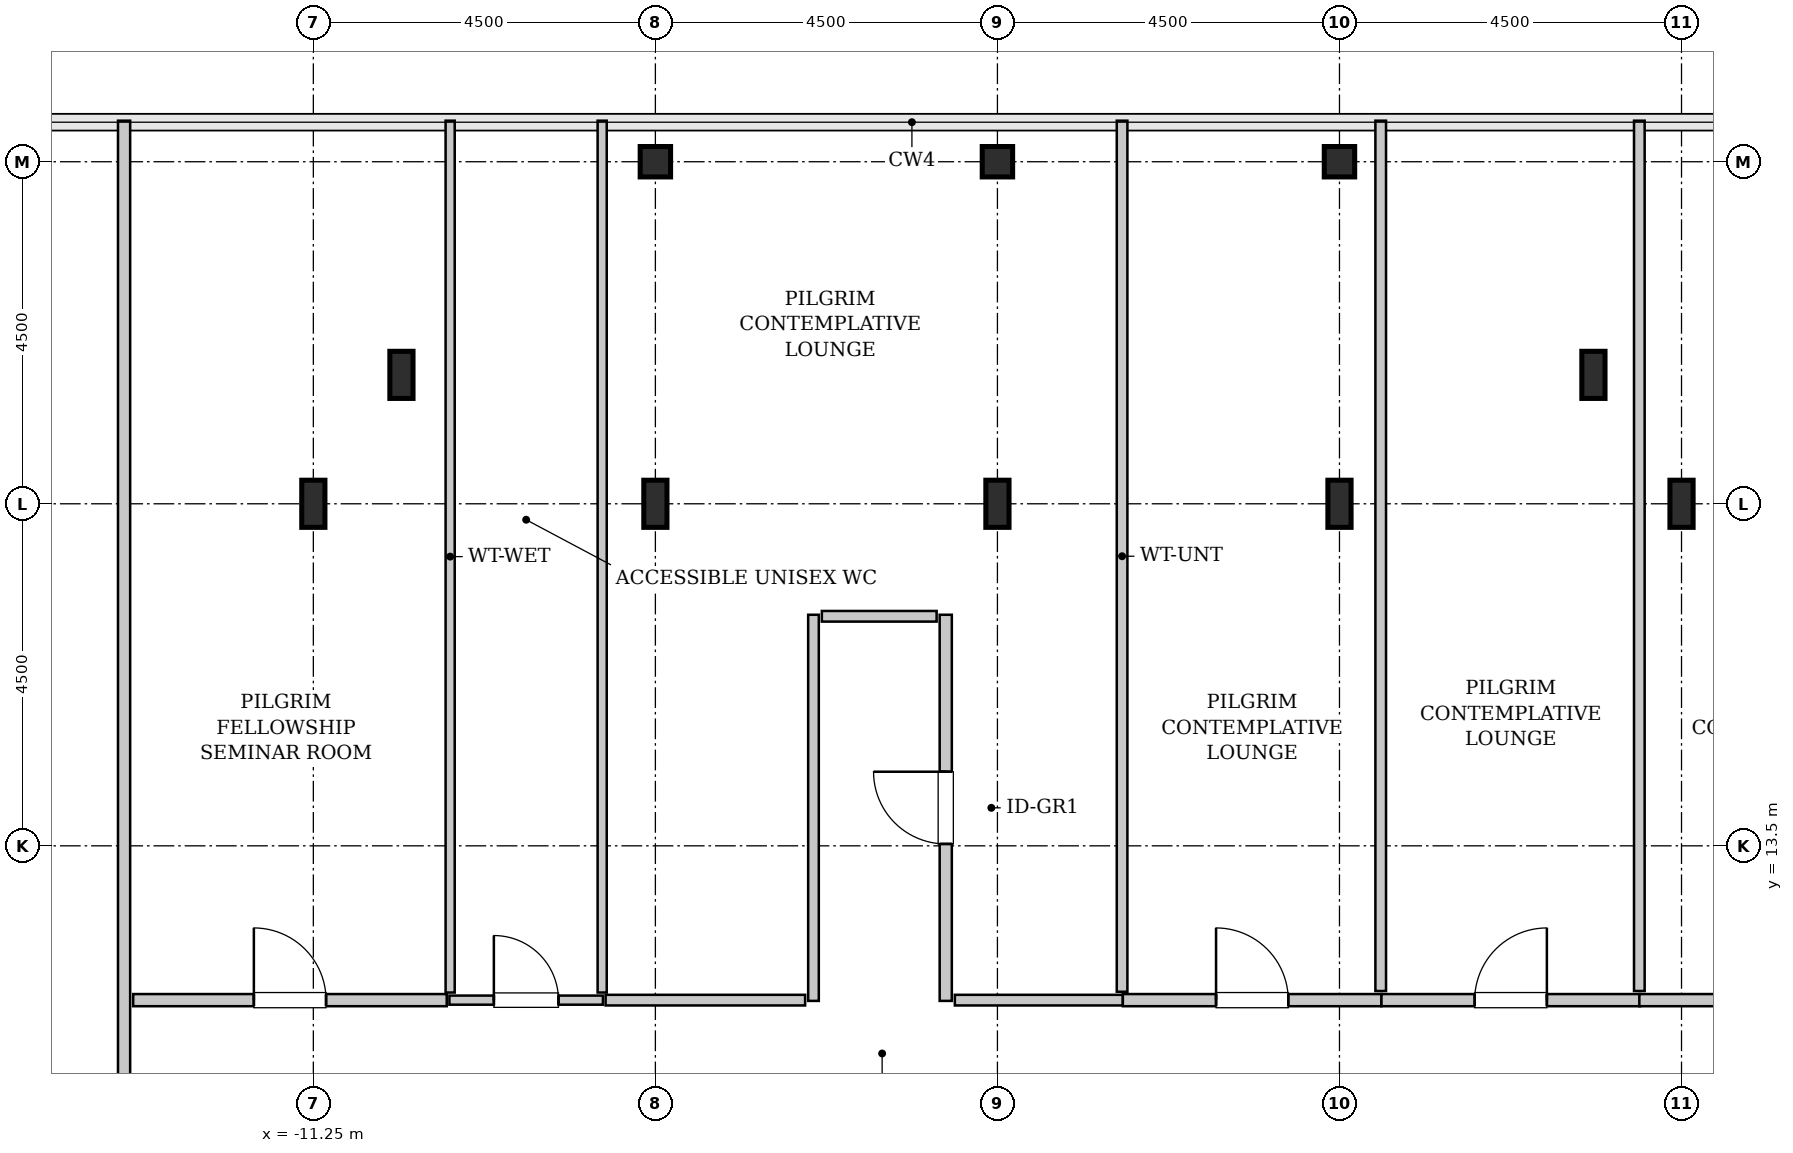
"""IFC4 building model, lengths in metres.
Left out: names, types, materials, properties, quantities, classifications, styles, units other than length and angle.
Written with IfcOpenShell. Run it as: python <this file> out.ifc"""

import sys

from ifc_helpers import new_model, si_unit, direction, frame, frame_2d, origin, origin_2d, place, context, subcontext, project, spatial, rectangle, hollow_rectangle, i_section, extrude, source, transform, mapped, element, fill, save


model = new_model("IFC4")
c1 = context("Model", 3, precision=1e-05, world=origin(), true_north=direction((0.0, 1.0)))
c2 = subcontext(c1, "Body", "Model", "MODEL_VIEW")
j1 = project(units=[si_unit("LENGTHUNIT", "METRE"), si_unit("PLANEANGLEUNIT", "RADIAN")], contexts=[c1])
p1 = place(None, origin())
s1 = spatial("IfcSite", under=j1, at=p1, CompositionType="ELEMENT")
p2 = place(p1, origin())
s2 = spatial("IfcBuilding", under=s1, at=p2, CompositionType="ELEMENT")
p3 = place(p2, frame((0.0, 0.0, 345.2)))
s3 = spatial("IfcBuildingStorey", under=s2, at=p3, CompositionType="ELEMENT", Elevation=345.2)
m1 = source(origin(), c2, "Body", "SweptSolid", [
    extrude(i_section(OverallWidth=0.305, OverallDepth=0.62, WebThickness=0.021, FlangeThickness=0.04, FilletRadius=0.027, at=origin_2d()), origin(), (0.0, 0.0, 1.0), 3.8),
])
for number, where, z_axis, x_axis in (
    (1, (-11.25, 18.0, 0.0), (0.0, 0.0, 1.0), (1.0, 0.0, 0.0)),
    (2, (-10.091, 19.696, 0.0), (0.0, 0.0, 1.0), (1.0, 0.0, 0.0)),
    (3, (-6.75, 18.0, 0.0), (0.0, 0.0, 1.0), (1.0, 0.0, 0.0)),
):
    element("IfcColumn", number, at=place(p3, frame(where, z_axis=z_axis, x_axis=x_axis)), inside=s3, PredefinedType="COLUMN", context=c2, shape_type="MappedRepresentation", body=[
        mapped(m1, transform((0.0, 0.0, 0.0), x_axis=(1.0, 0.0, 0.0), y_axis=(0.0, 1.0, 0.0), z_axis=(0.0, 0.0, 1.0), scale=1.0)),
    ])
m2 = source(origin(), c2, "Body", "SweptSolid", [
    extrude(hollow_rectangle(XDim=0.4, YDim=0.4, WallThickness=0.02, InnerFilletRadius=0.02, OuterFilletRadius=0.04, at=origin_2d()), origin(), (0.0, 0.0, 1.0), 3.8),
])
p4 = place(p3, frame((-6.75, 22.5, 0.0), z_axis=(0.0, 0.0, 1.0), x_axis=(1.0, 0.0, 0.0)))
e4 = element("IfcColumn", 4, at=p4, inside=s3, PredefinedType="COLUMN", context=c2, shape_type="MappedRepresentation", body=[
    mapped(m2, transform((0.0, 0.0, 0.0), x_axis=(1.0, 0.0, 0.0), y_axis=(0.0, 1.0, 0.0), z_axis=(0.0, 0.0, 1.0), scale=1.0)),
])
p5 = place(p3, frame((-2.25, 18.0, 0.0), z_axis=(0.0, 0.0, 1.0), x_axis=(1.0, 0.0, 0.0)))
e5 = element("IfcColumn", 5, at=p5, inside=s3, PredefinedType="COLUMN", context=c2, shape_type="MappedRepresentation", body=[
    mapped(m1, transform((0.0, 0.0, 0.0), x_axis=(1.0, 0.0, 0.0), y_axis=(0.0, 1.0, 0.0), z_axis=(0.0, 0.0, 1.0), scale=1.0)),
])
p6 = place(p3, frame((-2.25, 22.5, 0.0), z_axis=(0.0, 0.0, 1.0), x_axis=(1.0, 0.0, 0.0)))
e6 = element("IfcColumn", 6, at=p6, inside=s3, PredefinedType="COLUMN", context=c2, shape_type="MappedRepresentation", body=[
    mapped(m2, transform((0.0, 0.0, 0.0), x_axis=(1.0, 0.0, 0.0), y_axis=(0.0, 1.0, 0.0), z_axis=(0.0, 0.0, 1.0), scale=1.0)),
])
p7 = place(p3, frame((2.25, 18.0, 0.0), z_axis=(0.0, 0.0, 1.0), x_axis=(1.0, 0.0, 0.0)))
e7 = element("IfcColumn", 7, at=p7, inside=s3, PredefinedType="COLUMN", context=c2, shape_type="MappedRepresentation", body=[
    mapped(m1, transform((0.0, 0.0, 0.0), x_axis=(1.0, 0.0, 0.0), y_axis=(0.0, 1.0, 0.0), z_axis=(0.0, 0.0, 1.0), scale=1.0)),
])
p8 = place(p3, frame((2.25, 22.5, 0.0), z_axis=(0.0, 0.0, 1.0), x_axis=(1.0, 0.0, 0.0)))
e8 = element("IfcColumn", 8, at=p8, inside=s3, PredefinedType="COLUMN", context=c2, shape_type="MappedRepresentation", body=[
    mapped(m2, transform((0.0, 0.0, 0.0), x_axis=(1.0, 0.0, 0.0), y_axis=(0.0, 1.0, 0.0), z_axis=(0.0, 0.0, 1.0), scale=1.0)),
])
for number, where, z_axis, x_axis in (
    (9, (5.591, 19.696, 0.0), (0.0, 0.0, 1.0), (1.0, 0.0, 0.0)),
    (10, (6.75, 18.0, 0.0), (0.0, 0.0, 1.0), (1.0, 0.0, 0.0)),
):
    element("IfcColumn", number, at=place(p3, frame(where, z_axis=z_axis, x_axis=x_axis)), inside=s3, PredefinedType="COLUMN", context=c2, shape_type="MappedRepresentation", body=[
        mapped(m1, transform((0.0, 0.0, 0.0), x_axis=(1.0, 0.0, 0.0), y_axis=(0.0, 1.0, 0.0), z_axis=(0.0, 0.0, 1.0), scale=1.0)),
    ])
m3 = source(origin(), c2, "Body", "SweptSolid", [
    extrude(rectangle(XDim=2.02, YDim=0.12, at=frame_2d((1.01, 0.0))), origin(), (0.0, 0.0, 1.0), 3.485),
])
p9 = place(p3, frame((-9.46, 11.47, 0.0), z_axis=(0.0, 0.0, 1.0), x_axis=(1.0, 0.0, 0.0)))
e11 = element("IfcWall", 11, at=p9, inside=s3, PredefinedType="PLUMBINGWALL", context=c2, shape_type="MappedRepresentation", body=[
    mapped(m3, transform((0.0, 0.0, 0.0), x_axis=(1.0, 0.0, 0.0), y_axis=(0.0, 1.0, 0.0), z_axis=(0.0, 0.0, 1.0), scale=1.0)),
])
p10 = place(p9, frame((0.585, 0.0, 0.0)))
e12 = element("IfcOpeningElement", 12, at=p10, cuts=e11, PredefinedType="OPENING", context=c2, shape_type="SweptSolid", body=[
    extrude(rectangle(XDim=0.85, YDim=2.1, at=frame_2d((0.425, 1.05))), frame((0.0, 0.07, 0.0), z_axis=(0.0, -1.0, 0.0), x_axis=(1.0, 0.0, 0.0)), (0.0, 0.0, 1.0), 0.14),
])
m4 = source(origin(), c2, "Body", "SweptSolid", [
    extrude(rectangle(XDim=11.47, YDim=0.12, at=frame_2d((5.735, 0.0))), origin(), (0.0, 0.0, 1.0), 3.485),
])
for number, where, z_axis, x_axis in (
    (13, (-9.45, 11.57, 0.0), (0.0, 0.0, 1.0), (0.0, 1.0, 0.0)),
    (14, (-7.45, 11.57, 0.0), (0.0, 0.0, 1.0), (0.0, 1.0, 0.0)),
):
    element("IfcWall", number, at=place(p3, frame(where, z_axis=z_axis, x_axis=x_axis)), inside=s3, PredefinedType="PLUMBINGWALL", context=c2, shape_type="MappedRepresentation", body=[
        mapped(m4, transform((0.0, 0.0, 0.0), x_axis=(1.0, 0.0, 0.0), y_axis=(0.0, 1.0, 0.0), z_axis=(0.0, 0.0, 1.0), scale=1.0)),
    ])
m5 = source(origin(), c2, "Body", "SweptSolid", [
    extrude(rectangle(XDim=14.545, YDim=0.16, at=frame_2d((7.272, 0.0))), origin(), (0.0, 0.0, 1.0), 3.485),
])
p11 = place(p3, frame((-13.74, 8.495, 0.0), z_axis=(0.0, 0.0, 1.0), x_axis=(0.0, 1.0, 0.0)))
e15 = element("IfcWall", 15, at=p11, inside=s3, PredefinedType="PARTITIONING", context=c2, shape_type="MappedRepresentation", body=[
    mapped(m5, transform((0.0, 0.0, 0.0), x_axis=(1.0, 0.0, 0.0), y_axis=(0.0, 1.0, 0.0), z_axis=(0.0, 0.0, 1.0), scale=1.0)),
])
p12 = place(p11, frame((1.032, 0.0, 0.0)))
e16 = element("IfcOpeningElement", 16, at=p12, cuts=e15, PredefinedType="OPENING", context=c2, shape_type="SweptSolid", body=[
    extrude(rectangle(XDim=0.95, YDim=2.1, at=frame_2d((0.475, 1.05))), frame((0.0, 0.09, 0.0), z_axis=(0.0, -1.0, 0.0), x_axis=(1.0, 0.0, 0.0)), (0.0, 0.0, 1.0), 0.18),
])
m6 = source(origin(), c2, "Body", "SweptSolid", [
    extrude(rectangle(XDim=4.125, YDim=0.16, at=frame_2d((2.062, 0.0))), origin(), (0.0, 0.0, 1.0), 3.485),
])
p13 = place(p3, frame((-13.62, 11.47, 0.0), z_axis=(0.0, 0.0, 1.0), x_axis=(1.0, 0.0, 0.0)))
e17 = element("IfcWall", 17, at=p13, inside=s3, PredefinedType="PARTITIONING", context=c2, shape_type="MappedRepresentation", body=[
    mapped(m6, transform((0.0, 0.0, 0.0), x_axis=(1.0, 0.0, 0.0), y_axis=(0.0, 1.0, 0.0), z_axis=(0.0, 0.0, 1.0), scale=1.0)),
])
p14 = place(p13, frame((1.587, 0.0, 0.0)))
e18 = element("IfcOpeningElement", 18, at=p14, cuts=e17, PredefinedType="OPENING", context=c2, shape_type="SweptSolid", body=[
    extrude(rectangle(XDim=0.95, YDim=2.1, at=frame_2d((0.475, 1.05))), frame((0.0, 0.09, 0.0), z_axis=(0.0, -1.0, 0.0), x_axis=(1.0, 0.0, 0.0)), (0.0, 0.0, 1.0), 0.18),
])
m7 = source(origin(), c2, "Body", "SweptSolid", [
    extrude(rectangle(XDim=5.08, YDim=0.16, at=frame_2d((2.54, 0.0))), origin(), (0.0, 0.0, 1.0), 3.485),
])
p15 = place(p3, frame((-2.93, 11.46, 0.0), z_axis=(0.0, 0.0, 1.0), x_axis=(0.0, 1.0, 0.0)))
e19 = element("IfcWall", 19, at=p15, inside=s3, PredefinedType="PARTITIONING", context=c2, shape_type="MappedRepresentation", body=[
    mapped(m7, transform((0.0, 0.0, 0.0), x_axis=(1.0, 0.0, 0.0), y_axis=(0.0, 1.0, 0.0), z_axis=(0.0, 0.0, 1.0), scale=1.0)),
])
p16 = place(p15, frame((2.065, 0.0, 0.0)))
e20 = element("IfcOpeningElement", 20, at=p16, cuts=e19, PredefinedType="OPENING", context=c2, shape_type="SweptSolid", body=[
    extrude(rectangle(XDim=0.95, YDim=2.1, at=frame_2d((0.475, 1.05))), frame((0.0, 0.09, 0.0), z_axis=(0.0, -1.0, 0.0), x_axis=(1.0, 0.0, 0.0)), (0.0, 0.0, 1.0), 0.18),
])
m8 = source(origin(), c2, "Body", "SweptSolid", [
    extrude(rectangle(XDim=5.08, YDim=0.14, at=frame_2d((2.54, 0.0))), origin(), (0.0, 0.0, 1.0), 3.485),
])
p17 = place(p3, frame((-4.67, 11.46, 0.0), z_axis=(0.0, 0.0, 1.0), x_axis=(0.0, 1.0, 0.0)))
e21 = element("IfcWall", 21, at=p17, inside=s3, PredefinedType="PARTITIONING", context=c2, shape_type="MappedRepresentation", body=[
    mapped(m8, transform((0.0, 0.0, 0.0), x_axis=(1.0, 0.0, 0.0), y_axis=(0.0, 1.0, 0.0), z_axis=(0.0, 0.0, 1.0), scale=1.0)),
])
m9 = source(origin(), c2, "Body", "SweptSolid", [
    extrude(rectangle(XDim=2.625, YDim=0.14, at=frame_2d((1.312, 0.0))), origin(), (0.0, 0.0, 1.0), 3.485),
])
p18 = place(p3, frame((-7.405, 11.47, 0.0), z_axis=(0.0, 0.0, 1.0), x_axis=(1.0, 0.0, 0.0)))
e22 = element("IfcWall", 22, at=p18, inside=s3, PredefinedType="PARTITIONING", context=c2, shape_type="MappedRepresentation", body=[
    mapped(m9, transform((0.0, 0.0, 0.0), x_axis=(1.0, 0.0, 0.0), y_axis=(0.0, 1.0, 0.0), z_axis=(0.0, 0.0, 1.0), scale=1.0)),
])
m10 = source(origin(), c2, "Body", "SweptSolid", [
    extrude(rectangle(XDim=2.21, YDim=0.14, at=frame_2d((1.105, 0.0))), origin(), (0.0, 0.0, 1.0), 3.485),
])
p19 = place(p3, frame((-2.81, 11.47, 0.0), z_axis=(0.0, 0.0, 1.0), x_axis=(1.0, 0.0, 0.0)))
e23 = element("IfcWall", 23, at=p19, inside=s3, PredefinedType="PARTITIONING", context=c2, shape_type="MappedRepresentation", body=[
    mapped(m10, transform((0.0, 0.0, 0.0), x_axis=(1.0, 0.0, 0.0), y_axis=(0.0, 1.0, 0.0), z_axis=(0.0, 0.0, 1.0), scale=1.0)),
])
m11 = source(origin(), c2, "Body", "SweptSolid", [
    extrude(rectangle(XDim=1.51, YDim=0.14, at=frame_2d((0.755, 0.0))), origin(), (0.0, 0.0, 1.0), 3.485),
])
p20 = place(p3, frame((-4.56, 16.52, 0.0), z_axis=(0.0, 0.0, 1.0), x_axis=(1.0, 0.0, 0.0)))
e24 = element("IfcWall", 24, at=p20, inside=s3, PredefinedType="PARTITIONING", context=c2, shape_type="MappedRepresentation", body=[
    mapped(m11, transform((0.0, 0.0, 0.0), x_axis=(1.0, 0.0, 0.0), y_axis=(0.0, 1.0, 0.0), z_axis=(0.0, 0.0, 1.0), scale=1.0)),
])
m12 = source(origin(), c2, "Body", "SweptSolid", [
    extrude(rectangle(XDim=11.46, YDim=0.14, at=frame_2d((5.73, 0.0))), origin(), (0.0, 0.0, 1.0), 3.485),
])
p21 = place(p3, frame((-0.61, 11.58, 0.0), z_axis=(0.0, 0.0, 1.0), x_axis=(0.0, 1.0, 0.0)))
e25 = element("IfcWall", 25, at=p21, inside=s3, PredefinedType="PARTITIONING", context=c2, shape_type="MappedRepresentation", body=[
    mapped(m12, transform((0.0, 0.0, 0.0), x_axis=(1.0, 0.0, 0.0), y_axis=(0.0, 1.0, 0.0), z_axis=(0.0, 0.0, 1.0), scale=1.0)),
])
m13 = source(origin(), c2, "Body", "SweptSolid", [
    extrude(rectangle(XDim=3.403, YDim=0.16, at=frame_2d((1.701, 0.0))), origin(), (0.0, 0.0, 1.0), 3.485),
])
p22 = place(p3, frame((-0.6, 11.47, 0.0), z_axis=(0.0, 0.0, 1.0), x_axis=(1.0, 0.0, 0.0)))
e26 = element("IfcWall", 26, at=p22, inside=s3, PredefinedType="PARTITIONING", context=c2, shape_type="MappedRepresentation", body=[
    mapped(m13, transform((0.0, 0.0, 0.0), x_axis=(1.0, 0.0, 0.0), y_axis=(0.0, 1.0, 0.0), z_axis=(0.0, 0.0, 1.0), scale=1.0)),
])
p23 = place(p22, frame((1.226, 0.0, 0.0)))
e27 = element("IfcOpeningElement", 27, at=p23, cuts=e26, PredefinedType="OPENING", context=c2, shape_type="SweptSolid", body=[
    extrude(rectangle(XDim=0.95, YDim=2.1, at=frame_2d((0.475, 1.05))), frame((0.0, 0.09, 0.0), z_axis=(0.0, -1.0, 0.0), x_axis=(1.0, 0.0, 0.0)), (0.0, 0.0, 1.0), 0.18),
])
m14 = source(origin(), c2, "Body", "SweptSolid", [
    extrude(rectangle(XDim=11.45, YDim=0.14, at=frame_2d((5.725, 0.0))), origin(), (0.0, 0.0, 1.0), 3.485),
])
p24 = place(p3, frame((2.792, 11.59, 0.0), z_axis=(0.0, 0.0, 1.0), x_axis=(0.0, 1.0, 0.0)))
e28 = element("IfcWall", 28, at=p24, inside=s3, PredefinedType="PARTITIONING", context=c2, shape_type="MappedRepresentation", body=[
    mapped(m14, transform((0.0, 0.0, 0.0), x_axis=(1.0, 0.0, 0.0), y_axis=(0.0, 1.0, 0.0), z_axis=(0.0, 0.0, 1.0), scale=1.0)),
])
p25 = place(p3, frame((2.802, 11.47, 0.0), z_axis=(0.0, 0.0, 1.0), x_axis=(1.0, 0.0, 0.0)))
e29 = element("IfcWall", 29, at=p25, inside=s3, PredefinedType="PARTITIONING", context=c2, shape_type="MappedRepresentation", body=[
    mapped(m13, transform((0.0, 0.0, 0.0), x_axis=(1.0, 0.0, 0.0), y_axis=(0.0, 1.0, 0.0), z_axis=(0.0, 0.0, 1.0), scale=1.0)),
])
p26 = place(p25, frame((1.226, 0.0, 0.0)))
e30 = element("IfcOpeningElement", 30, at=p26, cuts=e29, PredefinedType="OPENING", context=c2, shape_type="SweptSolid", body=[
    extrude(rectangle(XDim=0.95, YDim=2.1, at=frame_2d((0.475, 1.05))), frame((0.0, 0.09, 0.0), z_axis=(0.0, -1.0, 0.0), x_axis=(1.0, 0.0, 0.0)), (0.0, 0.0, 1.0), 0.18),
])
p27 = place(p3, frame((6.195, 11.59, 0.0), z_axis=(0.0, 0.0, 1.0), x_axis=(0.0, 1.0, 0.0)))
e31 = element("IfcWall", 31, at=p27, inside=s3, PredefinedType="PARTITIONING", context=c2, shape_type="MappedRepresentation", body=[
    mapped(m14, transform((0.0, 0.0, 0.0), x_axis=(1.0, 0.0, 0.0), y_axis=(0.0, 1.0, 0.0), z_axis=(0.0, 0.0, 1.0), scale=1.0)),
])
m15 = source(origin(), c2, "Body", "SweptSolid", [
    extrude(rectangle(XDim=3.765, YDim=0.16, at=frame_2d((1.882, 0.0))), origin(), (0.0, 0.0, 1.0), 3.485),
])
p28 = place(p3, frame((6.195, 11.47, 0.0), z_axis=(0.0, 0.0, 1.0), x_axis=(1.0, 0.0, 0.0)))
e32 = element("IfcWall", 32, at=p28, inside=s3, PredefinedType="PARTITIONING", context=c2, shape_type="MappedRepresentation", body=[
    mapped(m15, transform((0.0, 0.0, 0.0), x_axis=(1.0, 0.0, 0.0), y_axis=(0.0, 1.0, 0.0), z_axis=(0.0, 0.0, 1.0), scale=1.0)),
])
p29 = place(p28, frame((1.407, 0.0, 0.0)))
e33 = element("IfcOpeningElement", 33, at=p29, cuts=e32, PredefinedType="OPENING", context=c2, shape_type="SweptSolid", body=[
    extrude(rectangle(XDim=0.95, YDim=2.1, at=frame_2d((0.475, 1.05))), frame((0.0, 0.09, 0.0), z_axis=(0.0, -1.0, 0.0), x_axis=(1.0, 0.0, 0.0)), (0.0, 0.0, 1.0), 0.18),
])
m16 = source(origin(), c2, "Body", "SweptSolid", [
    extrude(rectangle(XDim=0.85, YDim=2.1, at=frame_2d((0.425, 1.05))), frame((0.0, 0.025, 0.0), z_axis=(0.0, -1.0, 0.0), x_axis=(1.0, 0.0, 0.0)), (0.0, 0.0, 1.0), 0.05),
])
p30 = place(p10, origin())
e34 = element("IfcDoor", 34, at=p30, inside=s3, OperationType="SINGLE_SWING_LEFT", PredefinedType="DOOR", context=c2, shape_type="MappedRepresentation", body=[
    mapped(m16, transform((0.0, 0.0, 0.0), x_axis=(1.0, 0.0, 0.0), y_axis=(0.0, 1.0, 0.0), z_axis=(0.0, 0.0, 1.0), scale=1.0)),
])
fill(e12, e34)
m17 = source(origin(), c2, "Body", "SweptSolid", [
    extrude(rectangle(XDim=0.95, YDim=2.1, at=frame_2d((0.475, 1.05))), frame((0.0, 0.025, 0.0), z_axis=(0.0, -1.0, 0.0), x_axis=(1.0, 0.0, 0.0)), (0.0, 0.0, 1.0), 0.05),
])
p31 = place(p14, origin())
e35 = element("IfcDoor", 35, at=p31, inside=s3, OperationType="SINGLE_SWING_LEFT", PredefinedType="DOOR", context=c2, shape_type="MappedRepresentation", body=[
    mapped(m17, transform((0.0, 0.0, 0.0), x_axis=(1.0, 0.0, 0.0), y_axis=(0.0, 1.0, 0.0), z_axis=(0.0, 0.0, 1.0), scale=1.0)),
])
fill(e18, e35)
p32 = place(p16, origin())
e36 = element("IfcDoor", 36, at=p32, inside=s3, OperationType="SINGLE_SWING_RIGHT", PredefinedType="DOOR", context=c2, shape_type="MappedRepresentation", body=[
    mapped(m17, transform((0.0, 0.0, 0.0), x_axis=(1.0, 0.0, 0.0), y_axis=(0.0, 1.0, 0.0), z_axis=(0.0, 0.0, 1.0), scale=1.0)),
])
fill(e20, e36)
p33 = place(p23, origin())
e37 = element("IfcDoor", 37, at=p33, inside=s3, OperationType="SINGLE_SWING_LEFT", PredefinedType="DOOR", context=c2, shape_type="MappedRepresentation", body=[
    mapped(m17, transform((0.0, 0.0, 0.0), x_axis=(1.0, 0.0, 0.0), y_axis=(0.0, 1.0, 0.0), z_axis=(0.0, 0.0, 1.0), scale=1.0)),
])
fill(e27, e37)
p34 = place(p26, origin())
e38 = element("IfcDoor", 38, at=p34, inside=s3, OperationType="SINGLE_SWING_RIGHT", PredefinedType="DOOR", context=c2, shape_type="MappedRepresentation", body=[
    mapped(m17, transform((0.0, 0.0, 0.0), x_axis=(1.0, 0.0, 0.0), y_axis=(0.0, 1.0, 0.0), z_axis=(0.0, 0.0, 1.0), scale=1.0)),
])
fill(e30, e38)
save(model, sys.argv[1])
